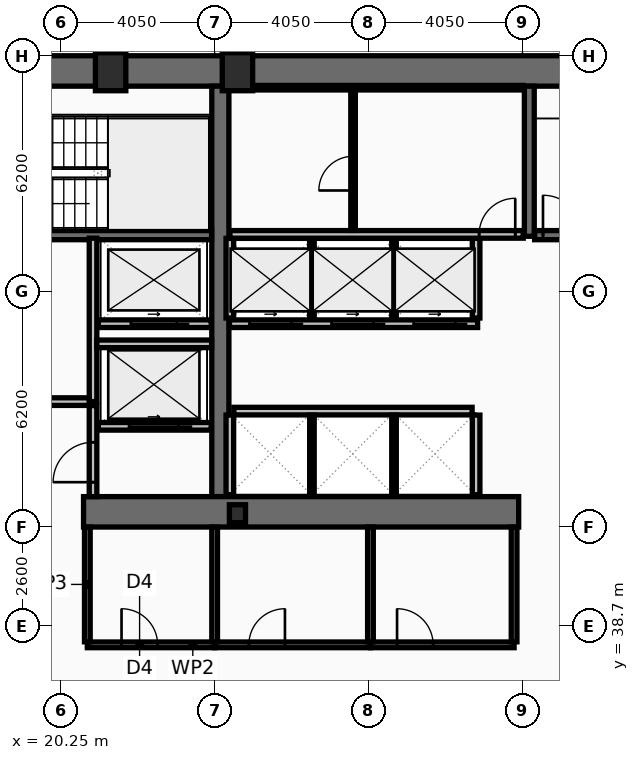
"""IFC4 building model, lengths in metres.
Left out: names, types, materials, properties, quantities, classifications, styles, units other than length and angle.
Written with IfcOpenShell. Run it as: python <this file> out.ifc"""

import sys

from ifc_helpers import new_model, si_unit, direction, frame, frame_2d, origin, origin_2d, place, context, subcontext, project, spatial, rectangle, hollow_rectangle, i_section, extrude, element, fill, save


model = new_model("IFC4")
c1 = context("Model", 3, precision=1e-05, world=origin(), true_north=direction((0.0, 1.0)))
c2 = subcontext(c1, "Body", "Model", "MODEL_VIEW")
j1 = project(units=[si_unit("LENGTHUNIT", "METRE"), si_unit("PLANEANGLEUNIT", "RADIAN")], contexts=[c1])
p1 = place(None, origin())
s1 = spatial("IfcSite", under=j1, at=p1, CompositionType="ELEMENT")
p2 = place(p1, origin())
s2 = spatial("IfcBuilding", under=s1, at=p2, CompositionType="ELEMENT")
p3 = place(p2, frame((0.0, 0.0, 25.8)))
s3 = spatial("IfcBuildingStorey", under=s2, at=p3, CompositionType="ELEMENT", Elevation=25.8)
p4 = place(p3, frame((16.2, 53.3, 0.0), z_axis=(0.0, 0.0, 1.0), x_axis=(1.0, 0.0, 0.0)))
e1 = element("IfcWall", 1, at=p4, inside=s3, PredefinedType="SHEAR", context=c2, shape_type="SweptSolid", body=[
    extrude(rectangle(XDim=40.5, YDim=0.8, at=frame_2d((20.25, 0.0))), origin(), (0.0, 0.0, 1.0), 3.82),
])
p5 = place(p3, frame((24.45, 42.1, 0.0), z_axis=(0.0, 0.0, 1.0), x_axis=(0.0, 1.0, 0.0)))
e2 = element("IfcWall", 2, at=p5, inside=s3, PredefinedType="SHEAR", context=c2, shape_type="SweptSolid", body=[
    extrude(rectangle(XDim=10.8, YDim=0.45, at=frame_2d((5.4, 0.0))), origin(), (0.0, 0.0, 1.0), 3.82),
])
p6 = place(p3, frame((32.3, 41.7, 0.0), z_axis=(0.0, 0.0, 1.0), x_axis=(-1.0, 0.0, 0.0)))
e3 = element("IfcWall", 3, at=p6, inside=s3, PredefinedType="SHEAR", context=c2, shape_type="SweptSolid", body=[
    extrude(rectangle(XDim=11.45, YDim=0.8, at=frame_2d((5.725, 0.0))), origin(), (0.0, 0.0, 1.0), 3.82),
])
p7 = place(p3, frame((32.58, 48.95, 0.0), z_axis=(0.0, 0.0, 1.0), x_axis=(0.0, 1.0, 0.0)))
e4 = element("IfcWall", 4, at=p7, inside=s3, PredefinedType="SHEAR", context=c2, shape_type="SweptSolid", body=[
    extrude(rectangle(XDim=3.95, YDim=0.26, at=frame_2d((1.975, 0.0))), origin(), (0.0, 0.0, 1.0), 3.82),
])
p8 = place(p3, frame((17.0, 48.98, 0.0), z_axis=(0.0, 0.0, 1.0), x_axis=(1.0, 0.0, 0.0)))
e5 = element("IfcWall", 5, at=p8, inside=s3, PredefinedType="SHEAR", context=c2, shape_type="SweptSolid", body=[
    extrude(rectangle(XDim=7.22, YDim=0.24, at=frame_2d((3.61, 0.0))), origin(), (0.0, 0.0, 1.0), 3.82),
])
p9 = place(p8, frame((0.22, 0.0, 0.0)))
e6 = element("IfcOpeningElement", 6, at=p9, cuts=e5, PredefinedType="OPENING", context=c2, shape_type="SweptSolid", body=[
    extrude(rectangle(XDim=1.05, YDim=2.15, at=frame_2d((0.525, 1.075))), frame((0.0, 0.13, 0.0), z_axis=(0.0, -1.0, 0.0), x_axis=(1.0, 0.0, 0.0)), (0.0, 0.0, 1.0), 0.26),
])
p10 = place(p3, frame((32.72, 48.98, 0.0), z_axis=(0.0, 0.0, 1.0), x_axis=(1.0, 0.0, 0.0)))
e7 = element("IfcWall", 7, at=p10, inside=s3, PredefinedType="SHEAR", context=c2, shape_type="SweptSolid", body=[
    extrude(rectangle(XDim=7.56, YDim=0.24, at=frame_2d((3.78, 0.0))), origin(), (0.0, 0.0, 1.0), 3.82),
])
p11 = place(p10, frame((0.22, 0.0, 0.0)))
e8 = element("IfcOpeningElement", 8, at=p11, cuts=e7, PredefinedType="OPENING", context=c2, shape_type="SweptSolid", body=[
    extrude(rectangle(XDim=1.05, YDim=2.15, at=frame_2d((0.525, 1.075))), frame((0.0, 0.13, 0.0), z_axis=(0.0, -1.0, 0.0), x_axis=(1.0, 0.0, 0.0)), (0.0, 0.0, 1.0), 0.26),
])
for number, where, z_axis, x_axis in (
    (9, (21.562, 53.28, 0.0), (0.0, 0.0, 1.0), (1.0, 0.0, 0.0)),
    (10, (24.9, 53.28, 0.0), (0.0, 0.0, 1.0), (1.0, 0.0, 0.0)),
):
    element("IfcColumn", number, at=place(p3, frame(where, z_axis=z_axis, x_axis=x_axis)), inside=s3, PredefinedType="COLUMN", context=c2, shape_type="SweptSolid", body=[
        extrude(hollow_rectangle(XDim=0.8, YDim=1.0, WallThickness=0.055, at=origin_2d()), origin(), (0.0, 0.0, 1.0), 4.0),
    ])
p12 = place(p3, frame((24.9, 41.65, 0.0), z_axis=(0.0, 0.0, 1.0), x_axis=(1.0, 0.0, 0.0)))
e11 = element("IfcColumn", 11, at=p12, inside=s3, PredefinedType="COLUMN", context=c2, shape_type="SweptSolid", body=[
    extrude(i_section(OverallWidth=0.424, OverallDepth=0.474, WebThickness=0.048, FlangeThickness=0.077, at=origin_2d()), origin(), (0.0, 0.0, 1.0), 4.0),
])
p13 = place(p3, frame((24.21, 43.95, 0.0), z_axis=(0.0, 0.0, 1.0), x_axis=(-1.0, 0.0, 0.0)))
e12 = element("IfcWall", 12, at=p13, inside=s3, PredefinedType="PARTITIONING", context=c2, shape_type="SweptSolid", body=[
    extrude(rectangle(XDim=2.97, YDim=0.2, at=frame_2d((1.485, 0.0))), origin(), (0.0, 0.0, 1.0), 3.82),
])
p14 = place(p13, frame((0.86, 0.0, 0.0)))
e13 = element("IfcOpeningElement", 13, at=p14, cuts=e12, PredefinedType="OPENING", context=c2, shape_type="SweptSolid", body=[
    extrude(rectangle(XDim=1.3, YDim=2.18, at=frame_2d((0.65, 1.09))), frame((0.0, 0.11, 0.0), z_axis=(0.0, -1.0, 0.0), x_axis=(1.0, 0.0, 0.0)), (0.0, 0.0, 1.0), 0.22),
])
p15 = place(p3, frame((24.21, 46.65, 0.0), z_axis=(0.0, 0.0, 1.0), x_axis=(-1.0, 0.0, 0.0)))
e14 = element("IfcWall", 14, at=p15, inside=s3, PredefinedType="PARTITIONING", context=c2, shape_type="SweptSolid", body=[
    extrude(rectangle(XDim=2.97, YDim=0.2, at=frame_2d((1.485, 0.0))), origin(), (0.0, 0.0, 1.0), 3.82),
])
p16 = place(p15, frame((0.91, 0.0, 0.0)))
e15 = element("IfcOpeningElement", 15, at=p16, cuts=e14, PredefinedType="OPENING", context=c2, shape_type="SweptSolid", body=[
    extrude(rectangle(XDim=1.2, YDim=2.18, at=frame_2d((0.6, 1.09))), frame((0.0, 0.11, 0.0), z_axis=(0.0, -1.0, 0.0), x_axis=(1.0, 0.0, 0.0)), (0.0, 0.0, 1.0), 0.22),
])
p17 = place(p3, frame((31.22, 46.65, 0.0), z_axis=(0.0, 0.0, 1.0), x_axis=(-1.0, 0.0, 0.0)))
e16 = element("IfcWall", 16, at=p17, inside=s3, PredefinedType="PARTITIONING", context=c2, shape_type="SweptSolid", body=[
    extrude(rectangle(XDim=6.53, YDim=0.2, at=frame_2d((3.265, 0.0))), origin(), (0.0, 0.0, 1.0), 3.82),
])
p18 = place(p17, frame((4.9, 0.0, 0.0)))
e17 = element("IfcOpeningElement", 17, at=p18, cuts=e16, PredefinedType="OPENING", context=c2, shape_type="SweptSolid", body=[
    extrude(rectangle(XDim=1.1, YDim=2.18, at=frame_2d((0.55, 1.09))), frame((0.0, 0.11, 0.0), z_axis=(0.0, -1.0, 0.0), x_axis=(1.0, 0.0, 0.0)), (0.0, 0.0, 1.0), 0.22),
])
p19 = place(p17, frame((2.74, 0.0, 0.0)))
e18 = element("IfcOpeningElement", 18, at=p19, cuts=e16, PredefinedType="OPENING", context=c2, shape_type="SweptSolid", body=[
    extrude(rectangle(XDim=1.1, YDim=2.18, at=frame_2d((0.55, 1.09))), frame((0.0, 0.11, 0.0), z_axis=(0.0, -1.0, 0.0), x_axis=(1.0, 0.0, 0.0)), (0.0, 0.0, 1.0), 0.22),
])
p20 = place(p17, frame((0.58, 0.0, 0.0)))
e19 = element("IfcOpeningElement", 19, at=p20, cuts=e16, PredefinedType="OPENING", context=c2, shape_type="SweptSolid", body=[
    extrude(rectangle(XDim=1.1, YDim=2.18, at=frame_2d((0.55, 1.09))), frame((0.0, 0.11, 0.0), z_axis=(0.0, -1.0, 0.0), x_axis=(1.0, 0.0, 0.0)), (0.0, 0.0, 1.0), 0.22),
])
p21 = place(p3, frame((21.1, 44.6, 0.0), z_axis=(0.0, 0.0, 1.0), x_axis=(0.0, 1.0, 0.0)))
e20 = element("IfcWall", 20, at=p21, inside=s3, PredefinedType="PARTITIONING", context=c2, shape_type="SweptSolid", body=[
    extrude(rectangle(XDim=4.3, YDim=0.2, at=frame_2d((2.15, 0.0))), origin(), (0.0, 0.0, 1.0), 3.82),
])
p22 = place(p3, frame((17.0, 44.6, 0.0), z_axis=(0.0, 0.0, 1.0), x_axis=(1.0, 0.0, 0.0)))
e21 = element("IfcWall", 21, at=p22, inside=s3, PredefinedType="PARTITIONING", context=c2, shape_type="SweptSolid", body=[
    extrude(rectangle(XDim=4.0, YDim=0.2, at=frame_2d((2.0, 0.0))), origin(), (0.0, 0.0, 1.0), 3.82),
])
p23 = place(p22, frame((1.25, 0.0, 0.0)))
e22 = element("IfcOpeningElement", 22, at=p23, cuts=e21, PredefinedType="OPENING", context=c2, shape_type="SweptSolid", body=[
    extrude(rectangle(XDim=1.05, YDim=2.15, at=frame_2d((0.525, 1.075))), frame((0.0, 0.11, 0.0), z_axis=(0.0, -1.0, 0.0), x_axis=(1.0, 0.0, 0.0)), (0.0, 0.0, 1.0), 0.22),
])
p24 = place(p3, frame((21.2, 46.12, 0.0), z_axis=(0.0, 0.0, 1.0), x_axis=(1.0, 0.0, 0.0)))
e23 = element("IfcWall", 23, at=p24, inside=s3, PredefinedType="PARTITIONING", context=c2, shape_type="SweptSolid", body=[
    extrude(rectangle(XDim=3.02, YDim=0.2, at=frame_2d((1.51, 0.0))), origin(), (0.0, 0.0, 1.0), 3.82),
])
p25 = place(p3, frame((21.1, 42.1, 0.0), z_axis=(0.0, 0.0, 1.0), x_axis=(0.0, 1.0, 0.0)))
e24 = element("IfcWall", 24, at=p25, inside=s3, PredefinedType="PARTITIONING", context=c2, shape_type="SweptSolid", body=[
    extrude(rectangle(XDim=2.395, YDim=0.2, at=frame_2d((1.198, 0.0))), origin(), (0.0, 0.0, 1.0), 3.82),
])
p26 = place(p25, frame((0.38, 0.0, 0.0)))
e25 = element("IfcOpeningElement", 25, at=p26, cuts=e24, PredefinedType="OPENING", context=c2, shape_type="SweptSolid", body=[
    extrude(rectangle(XDim=1.05, YDim=2.15, at=frame_2d((0.525, 1.075))), frame((0.0, 0.11, 0.0), z_axis=(0.0, -1.0, 0.0), x_axis=(1.0, 0.0, 0.0)), (0.0, 0.0, 1.0), 0.22),
])
for number, where, z_axis, x_axis in (
    (26, (24.7, 46.8, 0.0), (0.0, 0.0, 1.0), (0.0, 1.0, 0.0)),
    (27, (31.18, 46.8, 0.0), (0.0, 0.0, 1.0), (0.0, 1.0, 0.0)),
):
    element("IfcWall", number, at=place(p3, frame(where, z_axis=z_axis, x_axis=x_axis)), inside=s3, PredefinedType="PARTITIONING", context=c2, shape_type="SweptSolid", body=[
        extrude(rectangle(XDim=2.095, YDim=0.2, at=frame_2d((1.047, 0.0))), origin(), (0.0, 0.0, 1.0), 3.82),
    ])
for number, where, z_axis, x_axis in (
    (28, (26.86, 46.8, 0.0), (0.0, 0.0, 1.0), (0.0, 1.0, 0.0)),
    (29, (29.02, 46.8, 0.0), (0.0, 0.0, 1.0), (0.0, 1.0, 0.0)),
):
    element("IfcWall", number, at=place(p3, frame(where, z_axis=z_axis, x_axis=x_axis)), inside=s3, PredefinedType="PARTITIONING", context=c2, shape_type="SweptSolid", body=[
        extrude(rectangle(XDim=2.095, YDim=0.12, at=frame_2d((1.047, 0.0))), origin(), (0.0, 0.0, 1.0), 3.82),
    ])
p27 = place(p3, frame((24.805, 44.35, 0.0), z_axis=(0.0, 0.0, 1.0), x_axis=(1.0, 0.0, 0.0)))
e30 = element("IfcWall", 30, at=p27, inside=s3, PredefinedType="PARTITIONING", context=c2, shape_type="SweptSolid", body=[
    extrude(rectangle(XDim=6.27, YDim=0.2, at=frame_2d((3.135, 0.0))), origin(), (0.0, 0.0, 1.0), 3.82),
])
for number, where, z_axis, x_axis in (
    (31, (24.7, 42.15, 0.0), (0.0, 0.0, 1.0), (0.0, 1.0, 0.0)),
    (32, (31.18, 42.15, 0.0), (0.0, 0.0, 1.0), (0.0, 1.0, 0.0)),
):
    element("IfcWall", number, at=place(p3, frame(where, z_axis=z_axis, x_axis=x_axis)), inside=s3, PredefinedType="PARTITIONING", context=c2, shape_type="SweptSolid", body=[
        extrude(rectangle(XDim=2.095, YDim=0.2, at=frame_2d((1.048, 0.0))), origin(), (0.0, 0.0, 1.0), 3.82),
    ])
for number, where, z_axis, x_axis in (
    (33, (26.86, 42.15, 0.0), (0.0, 0.0, 1.0), (0.0, 1.0, 0.0)),
    (34, (29.02, 42.15, 0.0), (0.0, 0.0, 1.0), (0.0, 1.0, 0.0)),
):
    element("IfcWall", number, at=place(p3, frame(where, z_axis=z_axis, x_axis=x_axis)), inside=s3, PredefinedType="PARTITIONING", context=c2, shape_type="SweptSolid", body=[
        extrude(rectangle(XDim=2.095, YDim=0.12, at=frame_2d((1.048, 0.0))), origin(), (0.0, 0.0, 1.0), 3.82),
    ])
p28 = place(p3, frame((24.7, 52.86, 0.0), z_axis=(0.0, 0.0, 1.0), x_axis=(1.0, 0.0, 0.0)))
e35 = element("IfcWall", 35, at=p28, inside=s3, PredefinedType="PARTITIONING", context=c2, shape_type="SweptSolid", body=[
    extrude(rectangle(XDim=7.72, YDim=0.12, at=frame_2d((3.86, 0.0))), origin(), (0.0, 0.0, 1.0), 3.82),
])
p29 = place(p3, frame((24.7, 49.0, 0.0), z_axis=(0.0, 0.0, 1.0), x_axis=(1.0, 0.0, 0.0)))
e36 = element("IfcWall", 36, at=p29, inside=s3, PredefinedType="PARTITIONING", context=c2, shape_type="SweptSolid", body=[
    extrude(rectangle(XDim=7.72, YDim=0.2, at=frame_2d((3.86, 0.0))), origin(), (0.0, 0.0, 1.0), 3.82),
])
p30 = place(p29, frame((6.56, 0.0, 0.0)))
e37 = element("IfcOpeningElement", 37, at=p30, cuts=e36, PredefinedType="OPENING", context=c2, shape_type="SweptSolid", body=[
    extrude(rectangle(XDim=0.95, YDim=2.1, at=frame_2d((0.475, 1.05))), frame((0.0, 0.11, 0.0), z_axis=(0.0, -1.0, 0.0), x_axis=(1.0, 0.0, 0.0)), (0.0, 0.0, 1.0), 0.22),
])
p31 = place(p3, frame((27.942, 49.105, 0.0), z_axis=(0.0, 0.0, 1.0), x_axis=(0.0, 1.0, 0.0)))
e38 = element("IfcWall", 38, at=p31, inside=s3, PredefinedType="PARTITIONING", context=c2, shape_type="SweptSolid", body=[
    extrude(rectangle(XDim=3.69, YDim=0.12, at=frame_2d((1.845, 0.0))), origin(), (0.0, 0.0, 1.0), 3.82),
])
p32 = place(p31, frame((1.05, 0.0, 0.0)))
e39 = element("IfcOpeningElement", 39, at=p32, cuts=e38, PredefinedType="OPENING", context=c2, shape_type="SweptSolid", body=[
    extrude(rectangle(XDim=0.9, YDim=2.05, at=frame_2d((0.45, 1.025))), frame((0.0, 0.07, 0.0), z_axis=(0.0, -1.0, 0.0), x_axis=(1.0, 0.0, 0.0)), (0.0, 0.0, 1.0), 0.14),
])
p33 = place(p3, frame((20.95, 38.2, 0.0), z_axis=(0.0, 0.0, 1.0), x_axis=(1.0, 0.0, 0.0)))
e40 = element("IfcWall", 40, at=p33, inside=s3, PredefinedType="PARTITIONING", context=c2, shape_type="SweptSolid", body=[
    extrude(rectangle(XDim=3.35, YDim=0.15, at=frame_2d((1.675, 0.0))), origin(), (0.0, 0.0, 1.0), 3.82),
])
p34 = place(p33, frame((0.9, 0.0, 0.0)))
e41 = element("IfcOpeningElement", 41, at=p34, cuts=e40, PredefinedType="OPENING", context=c2, shape_type="SweptSolid", body=[
    extrude(rectangle(XDim=0.95, YDim=2.05, at=frame_2d((0.475, 1.025))), frame((0.0, 0.085, 0.0), z_axis=(0.0, -1.0, 0.0), x_axis=(1.0, 0.0, 0.0)), (0.0, 0.0, 1.0), 0.17),
])
p35 = place(p3, frame((24.3, 38.2, 0.0), z_axis=(0.0, 0.0, 1.0), x_axis=(1.0, 0.0, 0.0)))
e42 = element("IfcWall", 42, at=p35, inside=s3, PredefinedType="PARTITIONING", context=c2, shape_type="SweptSolid", body=[
    extrude(rectangle(XDim=4.1, YDim=0.15, at=frame_2d((2.05, 0.0))), origin(), (0.0, 0.0, 1.0), 3.01),
])
p36 = place(p35, frame((0.9, 0.0, 0.0)))
e43 = element("IfcOpeningElement", 43, at=p36, cuts=e42, PredefinedType="OPENING", context=c2, shape_type="SweptSolid", body=[
    extrude(rectangle(XDim=0.95, YDim=2.05, at=frame_2d((0.475, 1.025))), frame((0.0, 0.085, 0.0), z_axis=(0.0, -1.0, 0.0), x_axis=(1.0, 0.0, 0.0)), (0.0, 0.0, 1.0), 0.17),
])
p37 = place(p3, frame((28.4, 38.2, 0.0), z_axis=(0.0, 0.0, 1.0), x_axis=(1.0, 0.0, 0.0)))
e44 = element("IfcWall", 44, at=p37, inside=s3, PredefinedType="PARTITIONING", context=c2, shape_type="SweptSolid", body=[
    extrude(rectangle(XDim=3.78, YDim=0.15, at=frame_2d((1.89, 0.0))), origin(), (0.0, 0.0, 1.0), 3.01),
])
p38 = place(p37, frame((0.7, 0.0, 0.0)))
e45 = element("IfcOpeningElement", 45, at=p38, cuts=e44, PredefinedType="OPENING", context=c2, shape_type="SweptSolid", body=[
    extrude(rectangle(XDim=0.95, YDim=2.05, at=frame_2d((0.475, 1.025))), frame((0.0, 0.085, 0.0), z_axis=(0.0, -1.0, 0.0), x_axis=(1.0, 0.0, 0.0)), (0.0, 0.0, 1.0), 0.17),
])
for number, where, z_axis, x_axis in (
    (46, (20.95, 38.28, 0.0), (0.0, 0.0, 1.0), (0.0, 1.0, 0.0)),
    (47, (24.3, 38.28, 0.0), (0.0, 0.0, 1.0), (0.0, 1.0, 0.0)),
    (48, (28.4, 38.28, 0.0), (0.0, 0.0, 1.0), (0.0, 1.0, 0.0)),
    (49, (32.18, 38.28, 0.0), (0.0, 0.0, 1.0), (0.0, 1.0, 0.0)),
):
    element("IfcWall", number, at=place(p3, frame(where, z_axis=z_axis, x_axis=x_axis)), inside=s3, PredefinedType="PARTITIONING", context=c2, shape_type="SweptSolid", body=[
        extrude(rectangle(XDim=3.02, YDim=0.15, at=frame_2d((1.51, 0.0))), origin(), (0.0, 0.0, 1.0), 3.82),
    ])
p39 = place(p11, origin())
e50 = element("IfcDoor", 50, at=p39, inside=s3, OperationType="SINGLE_SWING_LEFT", PredefinedType="DOOR", context=c2, shape_type="SweptSolid", body=[
    extrude(rectangle(XDim=1.05, YDim=2.15, at=frame_2d((0.525, 1.075))), frame((0.0, 0.025, 0.0), z_axis=(0.0, -1.0, 0.0), x_axis=(1.0, 0.0, 0.0)), (0.0, 0.0, 1.0), 0.05),
])
fill(e8, e50)
p40 = place(p14, origin())
e51 = element("IfcDoor", 51, at=p40, inside=s3, OperationType="SLIDING_TO_LEFT", PredefinedType="DOOR", context=c2, shape_type="SweptSolid", body=[
    extrude(rectangle(XDim=1.3, YDim=2.18, at=frame_2d((0.65, 1.09))), frame((0.0, 0.025, 0.0), z_axis=(0.0, -1.0, 0.0), x_axis=(1.0, 0.0, 0.0)), (0.0, 0.0, 1.0), 0.05),
])
fill(e13, e51)
p41 = place(p16, origin())
e52 = element("IfcDoor", 52, at=p41, inside=s3, OperationType="SLIDING_TO_LEFT", PredefinedType="DOOR", context=c2, shape_type="SweptSolid", body=[
    extrude(rectangle(XDim=1.2, YDim=2.18, at=frame_2d((0.6, 1.09))), frame((0.0, 0.025, 0.0), z_axis=(0.0, -1.0, 0.0), x_axis=(1.0, 0.0, 0.0)), (0.0, 0.0, 1.0), 0.05),
])
fill(e15, e52)
p42 = place(p18, origin())
e53 = element("IfcDoor", 53, at=p42, inside=s3, OperationType="SLIDING_TO_LEFT", PredefinedType="DOOR", context=c2, shape_type="SweptSolid", body=[
    extrude(rectangle(XDim=1.1, YDim=2.18, at=frame_2d((0.55, 1.09))), frame((0.0, 0.025, 0.0), z_axis=(0.0, -1.0, 0.0), x_axis=(1.0, 0.0, 0.0)), (0.0, 0.0, 1.0), 0.05),
])
fill(e17, e53)
p43 = place(p19, origin())
e54 = element("IfcDoor", 54, at=p43, inside=s3, OperationType="SLIDING_TO_LEFT", PredefinedType="DOOR", context=c2, shape_type="SweptSolid", body=[
    extrude(rectangle(XDim=1.1, YDim=2.18, at=frame_2d((0.55, 1.09))), frame((0.0, 0.025, 0.0), z_axis=(0.0, -1.0, 0.0), x_axis=(1.0, 0.0, 0.0)), (0.0, 0.0, 1.0), 0.05),
])
fill(e18, e54)
p44 = place(p20, origin())
e55 = element("IfcDoor", 55, at=p44, inside=s3, OperationType="SLIDING_TO_LEFT", PredefinedType="DOOR", context=c2, shape_type="SweptSolid", body=[
    extrude(rectangle(XDim=1.1, YDim=2.18, at=frame_2d((0.55, 1.09))), frame((0.0, 0.025, 0.0), z_axis=(0.0, -1.0, 0.0), x_axis=(1.0, 0.0, 0.0)), (0.0, 0.0, 1.0), 0.05),
])
fill(e19, e55)
p45 = place(p26, origin())
e56 = element("IfcDoor", 56, at=p45, inside=s3, OperationType="SINGLE_SWING_LEFT", PredefinedType="DOOR", context=c2, shape_type="SweptSolid", body=[
    extrude(rectangle(XDim=1.05, YDim=2.15, at=frame_2d((0.525, 1.075))), frame((0.0, 0.025, 0.0), z_axis=(0.0, -1.0, 0.0), x_axis=(1.0, 0.0, 0.0)), (0.0, 0.0, 1.0), 0.05),
])
fill(e25, e56)
p46 = place(p30, origin())
e57 = element("IfcDoor", 57, at=p46, inside=s3, OperationType="SINGLE_SWING_RIGHT", PredefinedType="DOOR", context=c2, shape_type="SweptSolid", body=[
    extrude(rectangle(XDim=0.95, YDim=2.1, at=frame_2d((0.475, 1.05))), frame((0.0, 0.025, 0.0), z_axis=(0.0, -1.0, 0.0), x_axis=(1.0, 0.0, 0.0)), (0.0, 0.0, 1.0), 0.05),
])
fill(e37, e57)
p47 = place(p32, origin())
e58 = element("IfcDoor", 58, at=p47, inside=s3, OperationType="SINGLE_SWING_LEFT", PredefinedType="DOOR", context=c2, shape_type="SweptSolid", body=[
    extrude(rectangle(XDim=0.9, YDim=2.05, at=frame_2d((0.45, 1.025))), frame((0.0, 0.025, 0.0), z_axis=(0.0, -1.0, 0.0), x_axis=(1.0, 0.0, 0.0)), (0.0, 0.0, 1.0), 0.05),
])
fill(e39, e58)
p48 = place(p34, origin())
e59 = element("IfcDoor", 59, at=p48, inside=s3, OperationType="SINGLE_SWING_LEFT", PredefinedType="DOOR", context=c2, shape_type="SweptSolid", body=[
    extrude(rectangle(XDim=0.95, YDim=2.05, at=frame_2d((0.475, 1.025))), frame((0.0, 0.025, 0.0), z_axis=(0.0, -1.0, 0.0), x_axis=(1.0, 0.0, 0.0)), (0.0, 0.0, 1.0), 0.05),
])
fill(e41, e59)
p49 = place(p36, origin())
e60 = element("IfcDoor", 60, at=p49, inside=s3, OperationType="SINGLE_SWING_RIGHT", PredefinedType="DOOR", context=c2, shape_type="SweptSolid", body=[
    extrude(rectangle(XDim=0.95, YDim=2.05, at=frame_2d((0.475, 1.025))), frame((0.0, 0.025, 0.0), z_axis=(0.0, -1.0, 0.0), x_axis=(1.0, 0.0, 0.0)), (0.0, 0.0, 1.0), 0.05),
])
fill(e43, e60)
p50 = place(p38, origin())
e61 = element("IfcDoor", 61, at=p50, inside=s3, OperationType="SINGLE_SWING_LEFT", PredefinedType="DOOR", context=c2, shape_type="SweptSolid", body=[
    extrude(rectangle(XDim=0.95, YDim=2.05, at=frame_2d((0.475, 1.025))), frame((0.0, 0.025, 0.0), z_axis=(0.0, -1.0, 0.0), x_axis=(1.0, 0.0, 0.0)), (0.0, 0.0, 1.0), 0.05),
])
fill(e45, e61)
save(model, sys.argv[1])
